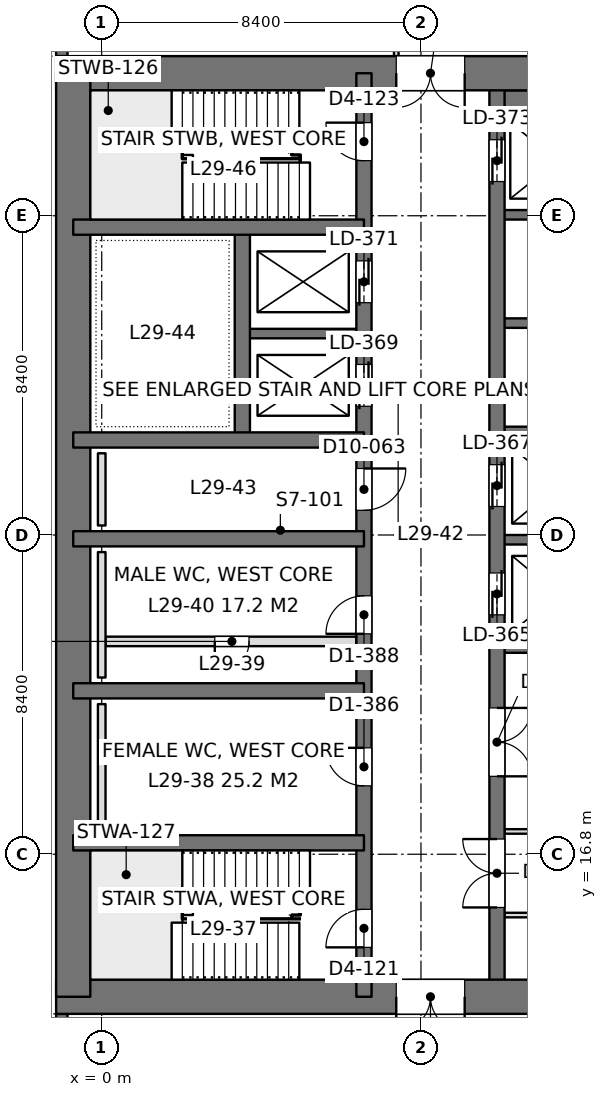
"""IFC4 building model, lengths in metres.
Left out: names, types, materials, properties, quantities, classifications, styles, units other than length and angle.
Written with IfcOpenShell. Run it as: python <this file> out.ifc"""

import sys

from ifc_helpers import new_model, si_unit, direction, frame, frame_2d, origin, place, context, subcontext, project, spatial, rectangle, extrude, element, fill, save


model = new_model("IFC4")
c1 = context("Model", 3, precision=1e-05, world=origin(), true_north=direction((0.0, 1.0)))
c2 = subcontext(c1, "Body", "Model", "MODEL_VIEW")
j1 = project(units=[si_unit("LENGTHUNIT", "METRE"), si_unit("PLANEANGLEUNIT", "RADIAN")], contexts=[c1])
p1 = place(None, origin())
s1 = spatial("IfcSite", under=j1, at=p1, CompositionType="ELEMENT")
p2 = place(p1, origin())
s2 = spatial("IfcBuilding", under=s1, at=p2, CompositionType="ELEMENT")
p3 = place(p2, frame((0.0, 0.0, 130.2)))
s3 = spatial("IfcBuildingStorey", under=s2, at=p3, CompositionType="ELEMENT", Elevation=130.2)
p4 = place(p3, frame((-1.2, 13.05, 0.0), z_axis=(0.0, 0.0, 1.0), x_axis=(1.0, 0.0, 0.0)))
e1 = element("IfcWall", 1, at=p4, inside=s3, PredefinedType="SHEAR", context=c2, shape_type="SweptSolid", body=[
    extrude(rectangle(XDim=18.0, YDim=0.9, at=frame_2d((9.0, 0.0))), origin(), (0.0, 0.0, 1.0), 4.2),
])
p5 = place(p4, frame((8.95, 0.0, 0.0)))
e2 = element("IfcOpeningElement", 2, at=p5, cuts=e1, PredefinedType="OPENING", context=c2, shape_type="SweptSolid", body=[
    extrude(rectangle(XDim=1.8, YDim=2.4, at=frame_2d((0.9, 1.2))), frame((0.0, 0.46, 0.0), z_axis=(0.0, -1.0, 0.0), x_axis=(1.0, 0.0, 0.0)), (0.0, 0.0, 1.0), 0.92),
])
p6 = place(p3, frame((-1.2, 37.35, 0.0), z_axis=(0.0, 0.0, 1.0), x_axis=(1.0, 0.0, 0.0)))
e3 = element("IfcWall", 3, at=p6, inside=s3, PredefinedType="SHEAR", context=c2, shape_type="SweptSolid", body=[
    extrude(rectangle(XDim=18.0, YDim=0.9, at=frame_2d((9.0, 0.0))), origin(), (0.0, 0.0, 1.0), 4.2),
])
p7 = place(p6, frame((8.95, 0.0, 0.0)))
e4 = element("IfcOpeningElement", 4, at=p7, cuts=e3, PredefinedType="OPENING", context=c2, shape_type="SweptSolid", body=[
    extrude(rectangle(XDim=1.8, YDim=2.4, at=frame_2d((0.9, 1.2))), frame((0.0, 0.46, 0.0), z_axis=(0.0, -1.0, 0.0), x_axis=(1.0, 0.0, 0.0)), (0.0, 0.0, 1.0), 0.92),
])
p8 = place(p3, frame((-0.75, 13.05, 0.0), z_axis=(0.0, 0.0, 1.0), x_axis=(0.0, 1.0, 0.0)))
e5 = element("IfcWall", 5, at=p8, inside=s3, PredefinedType="SHEAR", context=c2, shape_type="SweptSolid", body=[
    extrude(rectangle(XDim=24.3, YDim=0.9, at=frame_2d((12.15, 0.0))), origin(), (0.0, 0.0, 1.0), 4.2),
])
p9 = place(p3, frame((6.9, 13.05, 0.0), z_axis=(0.0, 0.0, 1.0), x_axis=(0.0, 1.0, 0.0)))
e6 = element("IfcWall", 6, at=p9, inside=s3, PredefinedType="SHEAR", context=c2, shape_type="SweptSolid", body=[
    extrude(rectangle(XDim=24.3, YDim=0.4, at=frame_2d((12.15, 0.0))), origin(), (0.0, 0.0, 1.0), 4.2),
])
p10 = place(p9, frame((1.3, 0.0, 0.0)))
e7 = element("IfcOpeningElement", 7, at=p10, cuts=e6, PredefinedType="OPENING", context=c2, shape_type="SweptSolid", body=[
    extrude(rectangle(XDim=1.0, YDim=2.2, at=frame_2d((0.5, 1.1))), frame((0.0, 0.21, 0.0), z_axis=(0.0, -1.0, 0.0), x_axis=(1.0, 0.0, 0.0)), (0.0, 0.0, 1.0), 0.42),
])
p11 = place(p9, frame((22.0, 0.0, 0.0)))
e8 = element("IfcOpeningElement", 8, at=p11, cuts=e6, PredefinedType="OPENING", context=c2, shape_type="SweptSolid", body=[
    extrude(rectangle(XDim=1.0, YDim=2.2, at=frame_2d((0.5, 1.1))), frame((0.0, 0.21, 0.0), z_axis=(0.0, -1.0, 0.0), x_axis=(1.0, 0.0, 0.0)), (0.0, 0.0, 1.0), 0.42),
])
p12 = place(p9, frame((5.55, 0.0, 0.0)))
e9 = element("IfcOpeningElement", 9, at=p12, cuts=e6, PredefinedType="OPENING", context=c2, shape_type="SweptSolid", body=[
    extrude(rectangle(XDim=1.0, YDim=2.2, at=frame_2d((0.5, 1.1))), frame((0.0, 0.21, 0.0), z_axis=(0.0, -1.0, 0.0), x_axis=(1.0, 0.0, 0.0)), (0.0, 0.0, 1.0), 0.42),
])
p13 = place(p9, frame((9.55, 0.0, 0.0)))
e10 = element("IfcOpeningElement", 10, at=p13, cuts=e6, PredefinedType="OPENING", context=c2, shape_type="SweptSolid", body=[
    extrude(rectangle(XDim=1.0, YDim=2.2, at=frame_2d((0.5, 1.1))), frame((0.0, 0.21, 0.0), z_axis=(0.0, -1.0, 0.0), x_axis=(1.0, 0.0, 0.0)), (0.0, 0.0, 1.0), 0.42),
])
p14 = place(p9, frame((12.8, 0.0, 0.0)))
e11 = element("IfcOpeningElement", 11, at=p14, cuts=e6, PredefinedType="OPENING", context=c2, shape_type="SweptSolid", body=[
    extrude(rectangle(XDim=1.1, YDim=2.2, at=frame_2d((0.55, 1.1))), frame((0.0, 0.21, 0.0), z_axis=(0.0, -1.0, 0.0), x_axis=(1.0, 0.0, 0.0)), (0.0, 0.0, 1.0), 0.42),
])
p15 = place(p9, frame((15.538, 0.0, 0.0)))
e12 = element("IfcOpeningElement", 12, at=p15, cuts=e6, PredefinedType="OPENING", context=c2, shape_type="SweptSolid", body=[
    extrude(rectangle(XDim=1.1, YDim=2.2, at=frame_2d((0.55, 1.1))), frame((0.0, 0.21, 0.0), z_axis=(0.0, -1.0, 0.0), x_axis=(1.0, 0.0, 0.0)), (0.0, 0.0, 1.0), 0.42),
])
p16 = place(p9, frame((18.262, 0.0, 0.0)))
e13 = element("IfcOpeningElement", 13, at=p16, cuts=e6, PredefinedType="OPENING", context=c2, shape_type="SweptSolid", body=[
    extrude(rectangle(XDim=1.1, YDim=2.2, at=frame_2d((0.55, 1.1))), frame((0.0, 0.21, 0.0), z_axis=(0.0, -1.0, 0.0), x_axis=(1.0, 0.0, 0.0)), (0.0, 0.0, 1.0), 0.42),
])
p17 = place(p3, frame((10.4, 13.05, 0.0), z_axis=(0.0, 0.0, 1.0), x_axis=(0.0, 1.0, 0.0)))
e14 = element("IfcWall", 14, at=p17, inside=s3, PredefinedType="SHEAR", context=c2, shape_type="SweptSolid", body=[
    extrude(rectangle(XDim=24.3, YDim=0.4, at=frame_2d((12.15, 0.0))), origin(), (0.0, 0.0, 1.0), 4.2),
])
p18 = place(p17, frame((10.05, 0.0, 0.0)))
e15 = element("IfcOpeningElement", 15, at=p18, cuts=e14, PredefinedType="OPENING", context=c2, shape_type="SweptSolid", body=[
    extrude(rectangle(XDim=1.1, YDim=2.2, at=frame_2d((0.55, 1.1))), frame((0.0, 0.21, 0.0), z_axis=(0.0, -1.0, 0.0), x_axis=(1.0, 0.0, 0.0)), (0.0, 0.0, 1.0), 0.42),
])
p19 = place(p17, frame((12.9, 0.0, 0.0)))
e16 = element("IfcOpeningElement", 16, at=p19, cuts=e14, PredefinedType="OPENING", context=c2, shape_type="SweptSolid", body=[
    extrude(rectangle(XDim=1.1, YDim=2.2, at=frame_2d((0.55, 1.1))), frame((0.0, 0.21, 0.0), z_axis=(0.0, -1.0, 0.0), x_axis=(1.0, 0.0, 0.0)), (0.0, 0.0, 1.0), 0.42),
])
p20 = place(p17, frame((21.45, 0.0, 0.0)))
e17 = element("IfcOpeningElement", 17, at=p20, cuts=e14, PredefinedType="OPENING", context=c2, shape_type="SweptSolid", body=[
    extrude(rectangle(XDim=1.1, YDim=2.2, at=frame_2d((0.55, 1.1))), frame((0.0, 0.21, 0.0), z_axis=(0.0, -1.0, 0.0), x_axis=(1.0, 0.0, 0.0)), (0.0, 0.0, 1.0), 0.42),
])
p21 = place(p17, frame((2.35, 0.0, 0.0)))
e18 = element("IfcOpeningElement", 18, at=p21, cuts=e14, PredefinedType="OPENING", context=c2, shape_type="SweptSolid", body=[
    extrude(rectangle(XDim=1.8, YDim=2.4, at=frame_2d((0.9, 1.2))), frame((0.0, 0.21, 0.0), z_axis=(0.0, -1.0, 0.0), x_axis=(1.0, 0.0, 0.0)), (0.0, 0.0, 1.0), 0.42),
])
p22 = place(p17, frame((5.8, 0.0, 0.0)))
e19 = element("IfcOpeningElement", 19, at=p22, cuts=e14, PredefinedType="OPENING", context=c2, shape_type="SweptSolid", body=[
    extrude(rectangle(XDim=1.8, YDim=2.4, at=frame_2d((0.9, 1.2))), frame((0.0, 0.21, 0.0), z_axis=(0.0, -1.0, 0.0), x_axis=(1.0, 0.0, 0.0)), (0.0, 0.0, 1.0), 0.42),
])
for number, where, z_axis, x_axis in (
    (20, (-0.75, 17.1, 0.0), (0.0, 0.0, 1.0), (1.0, 0.0, 0.0)),
    (21, (-0.75, 21.1, 0.0), (0.0, 0.0, 1.0), (1.0, 0.0, 0.0)),
    (22, (-0.75, 25.1, 0.0), (0.0, 0.0, 1.0), (1.0, 0.0, 0.0)),
    (23, (-0.75, 27.7, 0.0), (0.0, 0.0, 1.0), (1.0, 0.0, 0.0)),
    (24, (-0.75, 33.3, 0.0), (0.0, 0.0, 1.0), (1.0, 0.0, 0.0)),
):
    element("IfcWall", number, at=place(p3, frame(where, z_axis=z_axis, x_axis=x_axis)), inside=s3, PredefinedType="SHEAR", context=c2, shape_type="SweptSolid", body=[
        extrude(rectangle(XDim=7.65, YDim=0.4, at=frame_2d((3.825, 0.0))), origin(), (0.0, 0.0, 1.0), 4.2),
    ])
p23 = place(p3, frame((3.7, 27.7, 0.0), z_axis=(0.0, 0.0, 1.0), x_axis=(0.0, 1.0, 0.0)))
e25 = element("IfcWall", 25, at=p23, inside=s3, PredefinedType="SHEAR", context=c2, shape_type="SweptSolid", body=[
    extrude(rectangle(XDim=5.6, YDim=0.4, at=frame_2d((2.8, 0.0))), origin(), (0.0, 0.0, 1.0), 4.2),
])
p24 = place(p3, frame((3.7, 30.5, 0.0), z_axis=(0.0, 0.0, 1.0), x_axis=(1.0, 0.0, 0.0)))
e26 = element("IfcWall", 26, at=p24, inside=s3, PredefinedType="SHEAR", context=c2, shape_type="SweptSolid", body=[
    extrude(rectangle(XDim=3.2, YDim=0.25, at=frame_2d((1.6, 0.0))), origin(), (0.0, 0.0, 1.0), 4.2),
])
p25 = place(p3, frame((10.4, 22.225, 0.0), z_axis=(0.0, 0.0, 1.0), x_axis=(1.0, 0.0, 0.0)))
e27 = element("IfcWall", 27, at=p25, inside=s3, PredefinedType="SHEAR", context=c2, shape_type="SweptSolid", body=[
    extrude(rectangle(XDim=5.95, YDim=0.25, at=frame_2d((2.975, 0.0))), origin(), (0.0, 0.0, 1.0), 4.2),
])
for number, where, z_axis, x_axis in (
    (28, (10.4, 25.075, 0.0), (0.0, 0.0, 1.0), (1.0, 0.0, 0.0)),
    (29, (10.4, 27.925, 0.0), (0.0, 0.0, 1.0), (1.0, 0.0, 0.0)),
    (30, (10.4, 30.775, 0.0), (0.0, 0.0, 1.0), (1.0, 0.0, 0.0)),
    (31, (10.4, 33.625, 0.0), (0.0, 0.0, 1.0), (1.0, 0.0, 0.0)),
):
    element("IfcWall", number, at=place(p3, frame(where, z_axis=z_axis, x_axis=x_axis)), inside=s3, PredefinedType="SHEAR", context=c2, shape_type="SweptSolid", body=[
        extrude(rectangle(XDim=3.2, YDim=0.25, at=frame_2d((1.6, 0.0))), origin(), (0.0, 0.0, 1.0), 4.2),
    ])
p26 = place(p3, frame((10.4, 36.625, 0.0), z_axis=(0.0, 0.0, 1.0), x_axis=(1.0, 0.0, 0.0)))
e32 = element("IfcWall", 32, at=p26, inside=s3, PredefinedType="SHEAR", context=c2, shape_type="SweptSolid", body=[
    extrude(rectangle(XDim=3.2, YDim=0.55, at=frame_2d((1.6, 0.0))), origin(), (0.0, 0.0, 1.0), 4.2),
])
p27 = place(p3, frame((-1.05, 8.4, 0.0), z_axis=(0.0, 0.0, 1.0), x_axis=(0.0, 1.0, 0.0)))
e33 = element("IfcWall", 33, at=p27, inside=s3, PredefinedType="SOLIDWALL", context=c2, shape_type="SweptSolid", body=[
    extrude(rectangle(XDim=4.2, YDim=0.3, at=frame_2d((2.1, 0.0))), origin(), (0.0, 0.0, 1.0), 4.05),
])
p28 = place(p27, frame((0.9, 0.0, 0.9)))
e34 = element("IfcOpeningElement", 34, at=p28, cuts=e33, PredefinedType="OPENING", context=c2, shape_type="SweptSolid", body=[
    extrude(rectangle(XDim=2.4, YDim=1.9, at=frame_2d((1.2, 0.95))), frame((0.0, 0.16, 0.0), z_axis=(0.0, -1.0, 0.0), x_axis=(1.0, 0.0, 0.0)), (0.0, 0.0, 1.0), 0.32),
])
p29 = place(p3, frame((-1.05, 37.8, 0.0), z_axis=(0.0, 0.0, 1.0), x_axis=(0.0, 1.0, 0.0)))
e35 = element("IfcWall", 35, at=p29, inside=s3, PredefinedType="SOLIDWALL", context=c2, shape_type="SweptSolid", body=[
    extrude(rectangle(XDim=4.2, YDim=0.3, at=frame_2d((2.1, 0.0))), origin(), (0.0, 0.0, 1.0), 4.05),
])
p30 = place(p29, frame((0.9, 0.0, 0.9)))
e36 = element("IfcOpeningElement", 36, at=p30, cuts=e35, PredefinedType="OPENING", context=c2, shape_type="SweptSolid", body=[
    extrude(rectangle(XDim=2.4, YDim=1.9, at=frame_2d((1.2, 0.95))), frame((0.0, 0.16, 0.0), z_axis=(0.0, -1.0, 0.0), x_axis=(1.0, 0.0, 0.0)), (0.0, 0.0, 1.0), 0.32),
])
p31 = place(p3, frame((10.598, 17.4, 0.0), z_axis=(0.0, 0.0, 1.0), x_axis=(1.0, 0.0, 0.0)))
e37 = element("IfcWall", 37, at=p31, inside=s3, PredefinedType="PARTITIONING", context=c2, shape_type="SweptSolid", body=[
    extrude(rectangle(XDim=5.904, YDim=0.12, at=frame_2d((2.952, 0.0))), origin(), (0.0, 0.0, 1.0), 3.55),
])
p32 = place(p31, frame((4.152, 0.0, 0.0)))
e38 = element("IfcOpeningElement", 38, at=p32, cuts=e37, PredefinedType="OPENING", context=c2, shape_type="SweptSolid", body=[
    extrude(rectangle(XDim=1.0, YDim=2.4, at=frame_2d((0.5, 1.2))), frame((0.0, 0.07, 0.0), z_axis=(0.0, -1.0, 0.0), x_axis=(1.0, 0.0, 0.0)), (0.0, 0.0, 1.0), 0.14),
])
p33 = place(p3, frame((10.598, 15.2, 0.0), z_axis=(0.0, 0.0, 1.0), x_axis=(1.0, 0.0, 0.0)))
e39 = element("IfcWall", 39, at=p33, inside=s3, PredefinedType="PARTITIONING", context=c2, shape_type="SweptSolid", body=[
    extrude(rectangle(XDim=6.204, YDim=0.12, at=frame_2d((3.102, 0.0))), origin(), (0.0, 0.0, 1.0), 3.55),
])
p34 = place(p3, frame((7.75, 37.8, 0.0), z_axis=(0.0, 0.0, 1.0), x_axis=(0.0, 1.0, 0.0)))
e40 = element("IfcWall", 40, at=p34, inside=s3, PredefinedType="PARTITIONING", context=c2, shape_type="SweptSolid", body=[
    extrude(rectangle(XDim=2.0, YDim=0.12, at=frame_2d((1.0, 0.0))), origin(), (0.0, 0.0, 1.0), 4.05),
])
p35 = place(p3, frame((0.1, 22.4, 0.0), z_axis=(0.0, 0.0, 1.0), x_axis=(1.0, 0.0, 0.0)))
e41 = element("IfcWall", 41, at=p35, inside=s3, PredefinedType="PARTITIONING", context=c2, shape_type="SweptSolid", body=[
    extrude(rectangle(XDim=6.6, YDim=0.25, at=frame_2d((3.3, 0.0))), origin(), (0.0, 0.0, 1.0), 4.0),
])
p36 = place(p35, frame((2.875, 0.0, 0.0)))
e42 = element("IfcOpeningElement", 42, at=p36, cuts=e41, PredefinedType="OPENING", context=c2, shape_type="SweptSolid", body=[
    extrude(rectangle(XDim=0.9, YDim=2.2, at=frame_2d((0.45, 1.1))), frame((0.0, 0.135, 0.0), z_axis=(0.0, -1.0, 0.0), x_axis=(1.0, 0.0, 0.0)), (0.0, 0.0, 1.0), 0.27),
])
for number, where, z_axis, x_axis in (
    (43, (0.0, 17.45, 0.0), (0.0, 0.0, 1.0), (0.0, 1.0, 0.0)),
    (44, (0.0, 21.45, 0.0), (0.0, 0.0, 1.0), (0.0, 1.0, 0.0)),
):
    element("IfcWall", number, at=place(p3, frame(where, z_axis=z_axis, x_axis=x_axis)), inside=s3, PredefinedType="PLUMBINGWALL", context=c2, shape_type="SweptSolid", body=[
        extrude(rectangle(XDim=3.3, YDim=0.2, at=frame_2d((1.65, 0.0))), origin(), (0.0, 0.0, 1.0), 1.2),
    ])
p37 = place(p3, frame((0.0, 25.45, 0.0), z_axis=(0.0, 0.0, 1.0), x_axis=(0.0, 1.0, 0.0)))
e45 = element("IfcWall", 45, at=p37, inside=s3, PredefinedType="PLUMBINGWALL", context=c2, shape_type="SweptSolid", body=[
    extrude(rectangle(XDim=1.9, YDim=0.2, at=frame_2d((0.95, 0.0))), origin(), (0.0, 0.0, 1.0), 1.2),
])
p38 = place(p5, frame((1.8, 0.0, 0.0), z_axis=(0.0, 0.0, 1.0), x_axis=(-1.0, 0.0, 0.0)))
e46 = element("IfcDoor", 46, at=p38, inside=s3, OperationType="DOUBLE_DOOR_SINGLE_SWING", PredefinedType="DOOR", context=c2, shape_type="SweptSolid", body=[
    extrude(rectangle(XDim=1.8, YDim=2.4, at=frame_2d((0.9, 1.2))), frame((0.0, 0.025, 0.0), z_axis=(0.0, -1.0, 0.0), x_axis=(1.0, 0.0, 0.0)), (0.0, 0.0, 1.0), 0.05),
])
fill(e2, e46)
p39 = place(p7, frame((1.8, 0.0, 0.0), z_axis=(0.0, 0.0, 1.0), x_axis=(-1.0, 0.0, 0.0)))
e47 = element("IfcDoor", 47, at=p39, inside=s3, OperationType="DOUBLE_DOOR_SINGLE_SWING", PredefinedType="DOOR", context=c2, shape_type="SweptSolid", body=[
    extrude(rectangle(XDim=1.8, YDim=2.4, at=frame_2d((0.9, 1.2))), frame((0.0, 0.025, 0.0), z_axis=(0.0, -1.0, 0.0), x_axis=(1.0, 0.0, 0.0)), (0.0, 0.0, 1.0), 0.05),
])
fill(e4, e47)
p40 = place(p10, origin())
e48 = element("IfcDoor", 48, at=p40, inside=s3, OperationType="SINGLE_SWING_LEFT", PredefinedType="DOOR", context=c2, shape_type="SweptSolid", body=[
    extrude(rectangle(XDim=1.0, YDim=2.2, at=frame_2d((0.5, 1.1))), frame((0.0, 0.025, 0.0), z_axis=(0.0, -1.0, 0.0), x_axis=(1.0, 0.0, 0.0)), (0.0, 0.0, 1.0), 0.05),
])
fill(e7, e48)
p41 = place(p11, origin())
e49 = element("IfcDoor", 49, at=p41, inside=s3, OperationType="SINGLE_SWING_RIGHT", PredefinedType="DOOR", context=c2, shape_type="SweptSolid", body=[
    extrude(rectangle(XDim=1.0, YDim=2.2, at=frame_2d((0.5, 1.1))), frame((0.0, 0.025, 0.0), z_axis=(0.0, -1.0, 0.0), x_axis=(1.0, 0.0, 0.0)), (0.0, 0.0, 1.0), 0.05),
])
fill(e8, e49)
p42 = place(p12, origin())
e50 = element("IfcDoor", 50, at=p42, inside=s3, OperationType="SINGLE_SWING_RIGHT", PredefinedType="DOOR", context=c2, shape_type="SweptSolid", body=[
    extrude(rectangle(XDim=1.0, YDim=2.2, at=frame_2d((0.5, 1.1))), frame((0.0, 0.025, 0.0), z_axis=(0.0, -1.0, 0.0), x_axis=(1.0, 0.0, 0.0)), (0.0, 0.0, 1.0), 0.05),
])
fill(e9, e50)
p43 = place(p13, origin())
e51 = element("IfcDoor", 51, at=p43, inside=s3, OperationType="SINGLE_SWING_LEFT", PredefinedType="DOOR", context=c2, shape_type="SweptSolid", body=[
    extrude(rectangle(XDim=1.0, YDim=2.2, at=frame_2d((0.5, 1.1))), frame((0.0, 0.025, 0.0), z_axis=(0.0, -1.0, 0.0), x_axis=(1.0, 0.0, 0.0)), (0.0, 0.0, 1.0), 0.05),
])
fill(e10, e51)
p44 = place(p14, frame((1.1, 0.0, 0.0), z_axis=(0.0, 0.0, 1.0), x_axis=(-1.0, 0.0, 0.0)))
e52 = element("IfcDoor", 52, at=p44, inside=s3, OperationType="SINGLE_SWING_LEFT", PredefinedType="DOOR", context=c2, shape_type="SweptSolid", body=[
    extrude(rectangle(XDim=1.1, YDim=2.2, at=frame_2d((0.55, 1.1))), frame((0.0, 0.025, 0.0), z_axis=(0.0, -1.0, 0.0), x_axis=(1.0, 0.0, 0.0)), (0.0, 0.0, 1.0), 0.05),
])
fill(e11, e52)
p45 = place(p18, origin())
e53 = element("IfcDoor", 53, at=p45, inside=s3, OperationType="DOUBLE_DOOR_SLIDING", PredefinedType="DOOR", context=c2, shape_type="SweptSolid", body=[
    extrude(rectangle(XDim=1.1, YDim=2.2, at=frame_2d((0.55, 1.1))), frame((0.0, 0.025, 0.0), z_axis=(0.0, -1.0, 0.0), x_axis=(1.0, 0.0, 0.0)), (0.0, 0.0, 1.0), 0.05),
])
fill(e15, e53)
p46 = place(p19, origin())
e54 = element("IfcDoor", 54, at=p46, inside=s3, OperationType="DOUBLE_DOOR_SLIDING", PredefinedType="DOOR", context=c2, shape_type="SweptSolid", body=[
    extrude(rectangle(XDim=1.1, YDim=2.2, at=frame_2d((0.55, 1.1))), frame((0.0, 0.025, 0.0), z_axis=(0.0, -1.0, 0.0), x_axis=(1.0, 0.0, 0.0)), (0.0, 0.0, 1.0), 0.05),
])
fill(e16, e54)
p47 = place(p20, origin())
e55 = element("IfcDoor", 55, at=p47, inside=s3, OperationType="DOUBLE_DOOR_SLIDING", PredefinedType="DOOR", context=c2, shape_type="SweptSolid", body=[
    extrude(rectangle(XDim=1.1, YDim=2.2, at=frame_2d((0.55, 1.1))), frame((0.0, 0.025, 0.0), z_axis=(0.0, -1.0, 0.0), x_axis=(1.0, 0.0, 0.0)), (0.0, 0.0, 1.0), 0.05),
])
fill(e17, e55)
p48 = place(p15, origin())
e56 = element("IfcDoor", 56, at=p48, inside=s3, OperationType="DOUBLE_DOOR_SLIDING", PredefinedType="DOOR", context=c2, shape_type="SweptSolid", body=[
    extrude(rectangle(XDim=1.1, YDim=2.2, at=frame_2d((0.55, 1.1))), frame((0.0, 0.025, 0.0), z_axis=(0.0, -1.0, 0.0), x_axis=(1.0, 0.0, 0.0)), (0.0, 0.0, 1.0), 0.05),
])
fill(e12, e56)
p49 = place(p16, origin())
e57 = element("IfcDoor", 57, at=p49, inside=s3, OperationType="DOUBLE_DOOR_SLIDING", PredefinedType="DOOR", context=c2, shape_type="SweptSolid", body=[
    extrude(rectangle(XDim=1.1, YDim=2.2, at=frame_2d((0.55, 1.1))), frame((0.0, 0.025, 0.0), z_axis=(0.0, -1.0, 0.0), x_axis=(1.0, 0.0, 0.0)), (0.0, 0.0, 1.0), 0.05),
])
fill(e13, e57)
p50 = place(p21, origin())
e58 = element("IfcDoor", 58, at=p50, inside=s3, OperationType="DOUBLE_DOOR_SINGLE_SWING", PredefinedType="DOOR", context=c2, shape_type="SweptSolid", body=[
    extrude(rectangle(XDim=1.8, YDim=2.4, at=frame_2d((0.9, 1.2))), frame((0.0, 0.025, 0.0), z_axis=(0.0, -1.0, 0.0), x_axis=(1.0, 0.0, 0.0)), (0.0, 0.0, 1.0), 0.05),
])
fill(e18, e58)
p51 = place(p22, frame((1.8, 0.0, 0.0), z_axis=(0.0, 0.0, 1.0), x_axis=(-1.0, 0.0, 0.0)))
e59 = element("IfcDoor", 59, at=p51, inside=s3, OperationType="DOUBLE_DOOR_SINGLE_SWING", PredefinedType="DOOR", context=c2, shape_type="SweptSolid", body=[
    extrude(rectangle(XDim=1.8, YDim=2.4, at=frame_2d((0.9, 1.2))), frame((0.0, 0.025, 0.0), z_axis=(0.0, -1.0, 0.0), x_axis=(1.0, 0.0, 0.0)), (0.0, 0.0, 1.0), 0.05),
])
fill(e19, e59)
p52 = place(p36, frame((0.9, 0.0, 0.0), z_axis=(0.0, 0.0, 1.0), x_axis=(-1.0, 0.0, 0.0)))
e60 = element("IfcDoor", 60, at=p52, inside=s3, OperationType="SINGLE_SWING_RIGHT", PredefinedType="DOOR", context=c2, shape_type="SweptSolid", body=[
    extrude(rectangle(XDim=0.9, YDim=2.2, at=frame_2d((0.45, 1.1))), frame((0.0, 0.025, 0.0), z_axis=(0.0, -1.0, 0.0), x_axis=(1.0, 0.0, 0.0)), (0.0, 0.0, 1.0), 0.05),
])
fill(e42, e60)
save(model, sys.argv[1])
